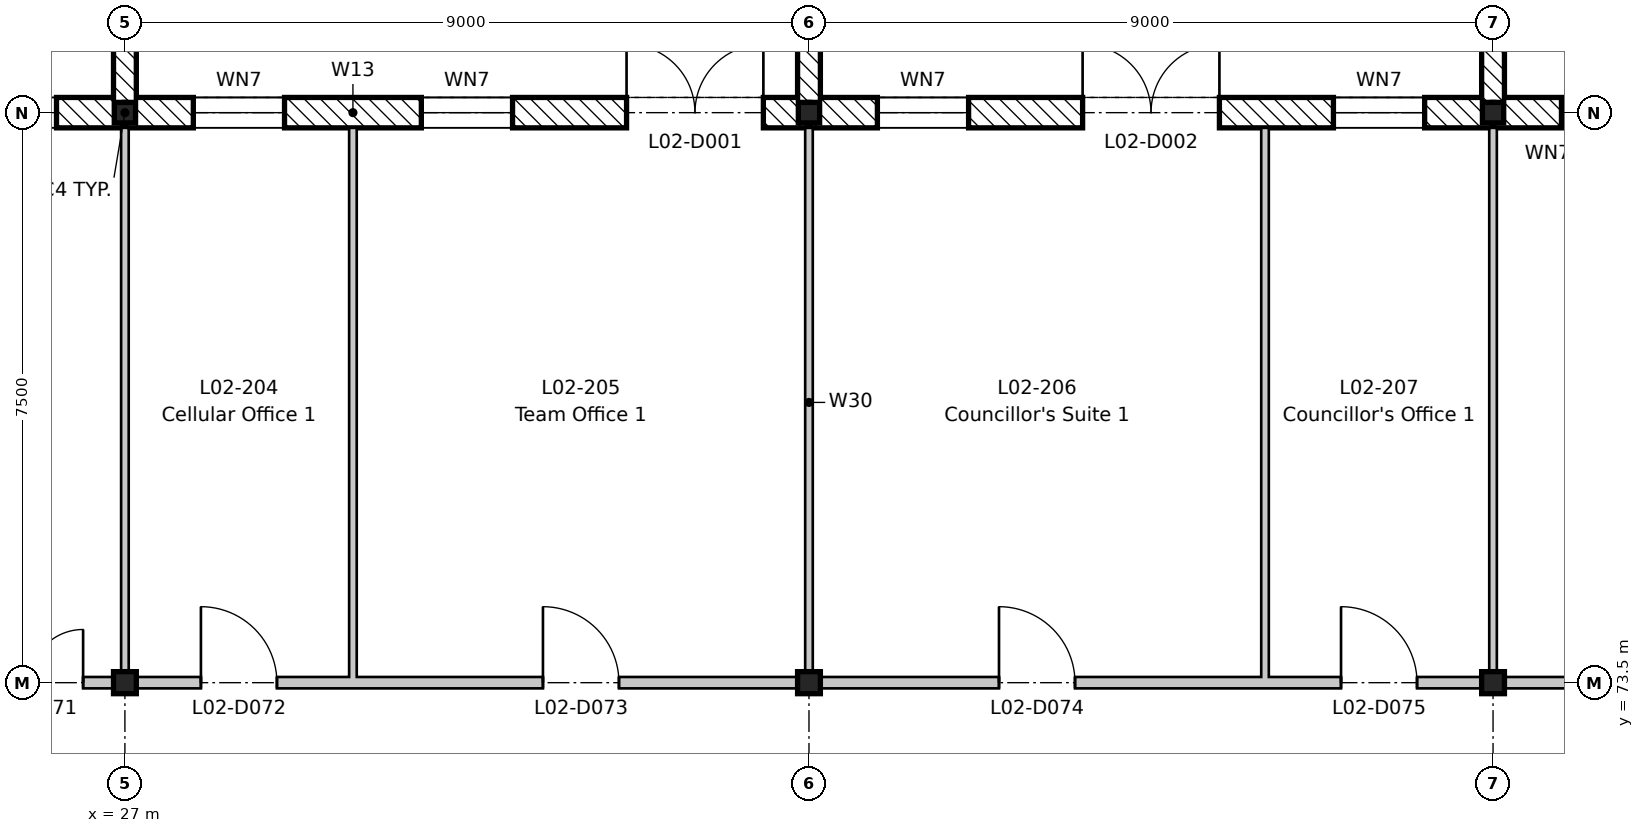
"""IFC4 building model, lengths in metres.
Left out: names, types, materials, properties, quantities, classifications, styles, units other than length and angle.
Written with IfcOpenShell. Run it as: python <this file> out.ifc"""

import sys

from ifc_helpers import new_model, si_unit, direction, frame, frame_2d, origin, origin_2d, place, context, subcontext, project, spatial, rectangle, i_section, extrude, element, fill, save


model = new_model("IFC4")
c1 = context("Model", 3, precision=1e-05, world=origin(), true_north=direction((0.0, 1.0)))
c2 = subcontext(c1, "Body", "Model", "MODEL_VIEW")
j1 = project(units=[si_unit("LENGTHUNIT", "METRE"), si_unit("PLANEANGLEUNIT", "RADIAN")], contexts=[c1])
p1 = place(None, origin())
s1 = spatial("IfcSite", under=j1, at=p1, CompositionType="ELEMENT")
p2 = place(p1, origin())
s2 = spatial("IfcBuilding", under=s1, at=p2, CompositionType="ELEMENT")
p3 = place(p2, frame((0.0, 0.0, 9.9)))
s3 = spatial("IfcBuildingStorey", under=s2, at=p3, CompositionType="ELEMENT", Elevation=9.9)
p4 = place(p3, frame((27.0, 73.5, -0.2), z_axis=(0.0, 0.0, 1.0), x_axis=(1.0, 0.0, 0.0)))
e1 = element("IfcColumn", 1, at=p4, inside=s3, PredefinedType="COLUMN", context=c2, shape_type="SweptSolid", body=[
    extrude(i_section(OverallWidth=0.3, OverallDepth=0.29, WebThickness=0.009, FlangeThickness=0.014, FilletRadius=0.027, at=origin_2d()), origin(), (0.0, 0.0, 1.0), 4.5),
])
p5 = place(p3, frame((27.0, 81.0, -0.2), z_axis=(0.0, 0.0, 1.0), x_axis=(1.0, 0.0, 0.0)))
e2 = element("IfcColumn", 2, at=p5, inside=s3, PredefinedType="COLUMN", context=c2, shape_type="SweptSolid", body=[
    extrude(i_section(OverallWidth=0.28, OverallDepth=0.27, WebThickness=0.008, FlangeThickness=0.013, FilletRadius=0.024, at=origin_2d()), origin(), (0.0, 0.0, 1.0), 4.5),
])
p6 = place(p3, frame((36.0, 73.5, -0.2), z_axis=(0.0, 0.0, 1.0), x_axis=(1.0, 0.0, 0.0)))
e3 = element("IfcColumn", 3, at=p6, inside=s3, PredefinedType="COLUMN", context=c2, shape_type="SweptSolid", body=[
    extrude(i_section(OverallWidth=0.3, OverallDepth=0.29, WebThickness=0.009, FlangeThickness=0.014, FilletRadius=0.027, at=origin_2d()), origin(), (0.0, 0.0, 1.0), 4.5),
])
p7 = place(p3, frame((36.0, 81.0, -0.2), z_axis=(0.0, 0.0, 1.0), x_axis=(1.0, 0.0, 0.0)))
e4 = element("IfcColumn", 4, at=p7, inside=s3, PredefinedType="COLUMN", context=c2, shape_type="SweptSolid", body=[
    extrude(i_section(OverallWidth=0.28, OverallDepth=0.27, WebThickness=0.008, FlangeThickness=0.013, FilletRadius=0.024, at=origin_2d()), origin(), (0.0, 0.0, 1.0), 4.5),
])
p8 = place(p3, frame((45.0, 73.5, -0.2), z_axis=(0.0, 0.0, 1.0), x_axis=(1.0, 0.0, 0.0)))
e5 = element("IfcColumn", 5, at=p8, inside=s3, PredefinedType="COLUMN", context=c2, shape_type="SweptSolid", body=[
    extrude(i_section(OverallWidth=0.3, OverallDepth=0.29, WebThickness=0.009, FlangeThickness=0.014, FilletRadius=0.027, at=origin_2d()), origin(), (0.0, 0.0, 1.0), 4.5),
])
p9 = place(p3, frame((45.0, 81.0, -0.2), z_axis=(0.0, 0.0, 1.0), x_axis=(1.0, 0.0, 0.0)))
e6 = element("IfcColumn", 6, at=p9, inside=s3, PredefinedType="COLUMN", context=c2, shape_type="SweptSolid", body=[
    extrude(i_section(OverallWidth=0.28, OverallDepth=0.27, WebThickness=0.008, FlangeThickness=0.013, FilletRadius=0.024, at=origin_2d()), origin(), (0.0, 0.0, 1.0), 4.5),
])
p10 = place(p3, frame((18.009, 81.0, 0.0), z_axis=(0.0, 0.0, 1.0), x_axis=(1.0, 0.0, 0.0)))
e7 = element("IfcWall", 7, at=p10, inside=s3, PredefinedType="STANDARD", context=c2, shape_type="SweptSolid", body=[
    extrude(rectangle(XDim=8.982, YDim=0.4, at=frame_2d((4.491, 0.0))), origin(), (0.0, 0.0, 1.0), 3.9),
])
p11 = place(p10, frame((0.891, 0.0, 0.9)))
e8 = element("IfcOpeningElement", 8, at=p11, cuts=e7, PredefinedType="OPENING", context=c2, shape_type="SweptSolid", body=[
    extrude(rectangle(XDim=1.2, YDim=2.4, at=frame_2d((0.6, 1.2))), frame((0.0, 0.21, 0.0), z_axis=(0.0, -1.0, 0.0), x_axis=(1.0, 0.0, 0.0)), (0.0, 0.0, 1.0), 0.42),
])
p12 = place(p10, frame((3.891, 0.0, 0.9)))
e9 = element("IfcOpeningElement", 9, at=p12, cuts=e7, PredefinedType="OPENING", context=c2, shape_type="SweptSolid", body=[
    extrude(rectangle(XDim=1.2, YDim=2.4, at=frame_2d((0.6, 1.2))), frame((0.0, 0.21, 0.0), z_axis=(0.0, -1.0, 0.0), x_axis=(1.0, 0.0, 0.0)), (0.0, 0.0, 1.0), 0.42),
])
p13 = place(p10, frame((6.891, 0.0, 0.9)))
e10 = element("IfcOpeningElement", 10, at=p13, cuts=e7, PredefinedType="OPENING", context=c2, shape_type="SweptSolid", body=[
    extrude(rectangle(XDim=1.2, YDim=2.4, at=frame_2d((0.6, 1.2))), frame((0.0, 0.21, 0.0), z_axis=(0.0, -1.0, 0.0), x_axis=(1.0, 0.0, 0.0)), (0.0, 0.0, 1.0), 0.42),
])
p14 = place(p3, frame((27.009, 81.0, 0.0), z_axis=(0.0, 0.0, 1.0), x_axis=(1.0, 0.0, 0.0)))
e11 = element("IfcWall", 11, at=p14, inside=s3, PredefinedType="STANDARD", context=c2, shape_type="SweptSolid", body=[
    extrude(rectangle(XDim=8.982, YDim=0.4, at=frame_2d((4.491, 0.0))), origin(), (0.0, 0.0, 1.0), 3.9),
])
p15 = place(p14, frame((6.591, 0.0, 0.0)))
e12 = element("IfcOpeningElement", 12, at=p15, cuts=e11, PredefinedType="OPENING", context=c2, shape_type="SweptSolid", body=[
    extrude(rectangle(XDim=1.8, YDim=2.4, at=frame_2d((0.9, 1.2))), frame((0.0, 0.21, 0.0), z_axis=(0.0, -1.0, 0.0), x_axis=(1.0, 0.0, 0.0)), (0.0, 0.0, 1.0), 0.42),
])
p16 = place(p14, frame((0.891, 0.0, 0.9)))
e13 = element("IfcOpeningElement", 13, at=p16, cuts=e11, PredefinedType="OPENING", context=c2, shape_type="SweptSolid", body=[
    extrude(rectangle(XDim=1.2, YDim=2.4, at=frame_2d((0.6, 1.2))), frame((0.0, 0.21, 0.0), z_axis=(0.0, -1.0, 0.0), x_axis=(1.0, 0.0, 0.0)), (0.0, 0.0, 1.0), 0.42),
])
p17 = place(p14, frame((3.891, 0.0, 0.9)))
e14 = element("IfcOpeningElement", 14, at=p17, cuts=e11, PredefinedType="OPENING", context=c2, shape_type="SweptSolid", body=[
    extrude(rectangle(XDim=1.2, YDim=2.4, at=frame_2d((0.6, 1.2))), frame((0.0, 0.21, 0.0), z_axis=(0.0, -1.0, 0.0), x_axis=(1.0, 0.0, 0.0)), (0.0, 0.0, 1.0), 0.42),
])
p18 = place(p3, frame((36.009, 81.0, 0.0), z_axis=(0.0, 0.0, 1.0), x_axis=(1.0, 0.0, 0.0)))
e15 = element("IfcWall", 15, at=p18, inside=s3, PredefinedType="STANDARD", context=c2, shape_type="SweptSolid", body=[
    extrude(rectangle(XDim=8.982, YDim=0.4, at=frame_2d((4.491, 0.0))), origin(), (0.0, 0.0, 1.0), 3.9),
])
p19 = place(p18, frame((3.591, 0.0, 0.0)))
e16 = element("IfcOpeningElement", 16, at=p19, cuts=e15, PredefinedType="OPENING", context=c2, shape_type="SweptSolid", body=[
    extrude(rectangle(XDim=1.8, YDim=2.4, at=frame_2d((0.9, 1.2))), frame((0.0, 0.21, 0.0), z_axis=(0.0, -1.0, 0.0), x_axis=(1.0, 0.0, 0.0)), (0.0, 0.0, 1.0), 0.42),
])
p20 = place(p18, frame((0.891, 0.0, 0.9)))
e17 = element("IfcOpeningElement", 17, at=p20, cuts=e15, PredefinedType="OPENING", context=c2, shape_type="SweptSolid", body=[
    extrude(rectangle(XDim=1.2, YDim=2.4, at=frame_2d((0.6, 1.2))), frame((0.0, 0.21, 0.0), z_axis=(0.0, -1.0, 0.0), x_axis=(1.0, 0.0, 0.0)), (0.0, 0.0, 1.0), 0.42),
])
p21 = place(p18, frame((6.891, 0.0, 0.9)))
e18 = element("IfcOpeningElement", 18, at=p21, cuts=e15, PredefinedType="OPENING", context=c2, shape_type="SweptSolid", body=[
    extrude(rectangle(XDim=1.2, YDim=2.4, at=frame_2d((0.6, 1.2))), frame((0.0, 0.21, 0.0), z_axis=(0.0, -1.0, 0.0), x_axis=(1.0, 0.0, 0.0)), (0.0, 0.0, 1.0), 0.42),
])
p22 = place(p3, frame((45.009, 81.0, 0.0), z_axis=(0.0, 0.0, 1.0), x_axis=(1.0, 0.0, 0.0)))
e19 = element("IfcWall", 19, at=p22, inside=s3, PredefinedType="STANDARD", context=c2, shape_type="SweptSolid", body=[
    extrude(rectangle(XDim=8.982, YDim=0.4, at=frame_2d((4.491, 0.0))), origin(), (0.0, 0.0, 1.0), 3.9),
])
p23 = place(p22, frame((0.891, 0.0, 0.9)))
e20 = element("IfcOpeningElement", 20, at=p23, cuts=e19, PredefinedType="OPENING", context=c2, shape_type="SweptSolid", body=[
    extrude(rectangle(XDim=1.2, YDim=2.4, at=frame_2d((0.6, 1.2))), frame((0.0, 0.21, 0.0), z_axis=(0.0, -1.0, 0.0), x_axis=(1.0, 0.0, 0.0)), (0.0, 0.0, 1.0), 0.42),
])
p24 = place(p22, frame((3.891, 0.0, 0.9)))
e21 = element("IfcOpeningElement", 21, at=p24, cuts=e19, PredefinedType="OPENING", context=c2, shape_type="SweptSolid", body=[
    extrude(rectangle(XDim=1.2, YDim=2.4, at=frame_2d((0.6, 1.2))), frame((0.0, 0.21, 0.0), z_axis=(0.0, -1.0, 0.0), x_axis=(1.0, 0.0, 0.0)), (0.0, 0.0, 1.0), 0.42),
])
p25 = place(p22, frame((6.891, 0.0, 0.9)))
e22 = element("IfcOpeningElement", 22, at=p25, cuts=e19, PredefinedType="OPENING", context=c2, shape_type="SweptSolid", body=[
    extrude(rectangle(XDim=1.2, YDim=2.4, at=frame_2d((0.6, 1.2))), frame((0.0, 0.21, 0.0), z_axis=(0.0, -1.0, 0.0), x_axis=(1.0, 0.0, 0.0)), (0.0, 0.0, 1.0), 0.42),
])
for number, where, z_axis, x_axis in (
    (23, (27.0, 81.135, 0.0), (0.0, 0.0, 1.0), (0.0, 1.0, 0.0)),
    (24, (36.0, 81.135, 0.0), (0.0, 0.0, 1.0), (0.0, 1.0, 0.0)),
    (25, (45.0, 81.135, 0.0), (0.0, 0.0, 1.0), (0.0, 1.0, 0.0)),
):
    element("IfcWall", number, at=place(p3, frame(where, z_axis=z_axis, x_axis=x_axis)), inside=s3, PredefinedType="STANDARD", context=c2, shape_type="SweptSolid", body=[
        extrude(rectangle(XDim=2.865, YDim=0.3, at=frame_2d((1.433, 0.0))), origin(), (0.0, 0.0, 1.0), 3.97),
    ])
p26 = place(p3, frame((27.0, 73.575, 0.0), z_axis=(0.0, 0.0, 1.0), x_axis=(0.0, 1.0, 0.0)))
e26 = element("IfcWall", 26, at=p26, inside=s3, PredefinedType="PARTITIONING", context=c2, shape_type="SweptSolid", body=[
    extrude(rectangle(XDim=7.225, YDim=0.1, at=frame_2d((3.613, 0.0))), origin(), (0.0, 0.0, 1.0), 3.95),
])
p27 = place(p3, frame((30.0, 73.575, 0.0), z_axis=(0.0, 0.0, 1.0), x_axis=(0.0, 1.0, 0.0)))
e27 = element("IfcWall", 27, at=p27, inside=s3, PredefinedType="PARTITIONING", context=c2, shape_type="SweptSolid", body=[
    extrude(rectangle(XDim=7.225, YDim=0.1, at=frame_2d((3.613, 0.0))), origin(), (0.0, 0.0, 1.0), 4.3),
])
p28 = place(p3, frame((36.0, 73.575, 0.0), z_axis=(0.0, 0.0, 1.0), x_axis=(0.0, 1.0, 0.0)))
e28 = element("IfcWall", 28, at=p28, inside=s3, PredefinedType="PARTITIONING", context=c2, shape_type="SweptSolid", body=[
    extrude(rectangle(XDim=7.225, YDim=0.1, at=frame_2d((3.613, 0.0))), origin(), (0.0, 0.0, 1.0), 3.95),
])
p29 = place(p3, frame((42.0, 73.575, 0.0), z_axis=(0.0, 0.0, 1.0), x_axis=(0.0, 1.0, 0.0)))
e29 = element("IfcWall", 29, at=p29, inside=s3, PredefinedType="PARTITIONING", context=c2, shape_type="SweptSolid", body=[
    extrude(rectangle(XDim=7.225, YDim=0.1, at=frame_2d((3.613, 0.0))), origin(), (0.0, 0.0, 1.0), 4.3),
])
p30 = place(p3, frame((45.0, 73.575, 0.0), z_axis=(0.0, 0.0, 1.0), x_axis=(0.0, 1.0, 0.0)))
e30 = element("IfcWall", 30, at=p30, inside=s3, PredefinedType="PARTITIONING", context=c2, shape_type="SweptSolid", body=[
    extrude(rectangle(XDim=7.225, YDim=0.1, at=frame_2d((3.613, 0.0))), origin(), (0.0, 0.0, 1.0), 3.95),
])
p31 = place(p3, frame((18.0, 73.5, 0.0), z_axis=(0.0, 0.0, 1.0), x_axis=(1.0, 0.0, 0.0)))
e31 = element("IfcWall", 31, at=p31, inside=s3, PredefinedType="PARTITIONING", context=c2, shape_type="SweptSolid", body=[
    extrude(rectangle(XDim=35.8, YDim=0.15, at=frame_2d((17.9, 0.0))), origin(), (0.0, 0.0, 1.0), 3.78),
])
p32 = place(p31, frame((7.05, 0.0, 0.0)))
e32 = element("IfcOpeningElement", 32, at=p32, cuts=e31, PredefinedType="OPENING", context=c2, shape_type="SweptSolid", body=[
    extrude(rectangle(XDim=1.4, YDim=2.1, at=frame_2d((0.7, 1.05))), frame((0.0, 0.085, 0.0), z_axis=(0.0, -1.0, 0.0), x_axis=(1.0, 0.0, 0.0)), (0.0, 0.0, 1.0), 0.17),
])
p33 = place(p31, frame((10.0, 0.0, 0.0)))
e33 = element("IfcOpeningElement", 33, at=p33, cuts=e31, PredefinedType="OPENING", context=c2, shape_type="SweptSolid", body=[
    extrude(rectangle(XDim=1.0, YDim=2.1, at=frame_2d((0.5, 1.05))), frame((0.0, 0.085, 0.0), z_axis=(0.0, -1.0, 0.0), x_axis=(1.0, 0.0, 0.0)), (0.0, 0.0, 1.0), 0.17),
])
p34 = place(p31, frame((14.5, 0.0, 0.0)))
e34 = element("IfcOpeningElement", 34, at=p34, cuts=e31, PredefinedType="OPENING", context=c2, shape_type="SweptSolid", body=[
    extrude(rectangle(XDim=1.0, YDim=2.1, at=frame_2d((0.5, 1.05))), frame((0.0, 0.085, 0.0), z_axis=(0.0, -1.0, 0.0), x_axis=(1.0, 0.0, 0.0)), (0.0, 0.0, 1.0), 0.17),
])
p35 = place(p31, frame((20.5, 0.0, 0.0)))
e35 = element("IfcOpeningElement", 35, at=p35, cuts=e31, PredefinedType="OPENING", context=c2, shape_type="SweptSolid", body=[
    extrude(rectangle(XDim=1.0, YDim=2.1, at=frame_2d((0.5, 1.05))), frame((0.0, 0.085, 0.0), z_axis=(0.0, -1.0, 0.0), x_axis=(1.0, 0.0, 0.0)), (0.0, 0.0, 1.0), 0.17),
])
p36 = place(p31, frame((25.0, 0.0, 0.0)))
e36 = element("IfcOpeningElement", 36, at=p36, cuts=e31, PredefinedType="OPENING", context=c2, shape_type="SweptSolid", body=[
    extrude(rectangle(XDim=1.0, YDim=2.1, at=frame_2d((0.5, 1.05))), frame((0.0, 0.085, 0.0), z_axis=(0.0, -1.0, 0.0), x_axis=(1.0, 0.0, 0.0)), (0.0, 0.0, 1.0), 0.17),
])
p37 = place(p31, frame((30.8, 0.0, 0.0)))
e37 = element("IfcOpeningElement", 37, at=p37, cuts=e31, PredefinedType="OPENING", context=c2, shape_type="SweptSolid", body=[
    extrude(rectangle(XDim=1.4, YDim=2.1, at=frame_2d((0.7, 1.05))), frame((0.0, 0.085, 0.0), z_axis=(0.0, -1.0, 0.0), x_axis=(1.0, 0.0, 0.0)), (0.0, 0.0, 1.0), 0.17),
])
p38 = place(p13, origin())
e38 = element("IfcWindow", 38, at=p38, inside=s3, PartitioningType="SINGLE_PANEL", PredefinedType="WINDOW", context=c2, shape_type="SweptSolid", body=[
    extrude(rectangle(XDim=1.2, YDim=2.4, at=frame_2d((0.6, 1.2))), frame((0.0, -0.12, 0.0), z_axis=(0.0, -1.0, 0.0), x_axis=(1.0, 0.0, 0.0)), (0.0, 0.0, 1.0), 0.06),
])
fill(e10, e38)
p39 = place(p15, origin())
e39 = element("IfcDoor", 39, at=p39, inside=s3, OperationType="DOUBLE_DOOR_SINGLE_SWING", PredefinedType="DOOR", context=c2, shape_type="SweptSolid", body=[
    extrude(rectangle(XDim=1.8, YDim=2.4, at=frame_2d((0.9, 1.2))), frame((0.0, 0.025, 0.0), z_axis=(0.0, -1.0, 0.0), x_axis=(1.0, 0.0, 0.0)), (0.0, 0.0, 1.0), 0.05),
])
fill(e12, e39)
p40 = place(p16, origin())
e40 = element("IfcWindow", 40, at=p40, inside=s3, PartitioningType="SINGLE_PANEL", PredefinedType="WINDOW", context=c2, shape_type="SweptSolid", body=[
    extrude(rectangle(XDim=1.2, YDim=2.4, at=frame_2d((0.6, 1.2))), frame((0.0, -0.12, 0.0), z_axis=(0.0, -1.0, 0.0), x_axis=(1.0, 0.0, 0.0)), (0.0, 0.0, 1.0), 0.06),
])
fill(e13, e40)
p41 = place(p17, origin())
e41 = element("IfcWindow", 41, at=p41, inside=s3, PartitioningType="SINGLE_PANEL", PredefinedType="WINDOW", context=c2, shape_type="SweptSolid", body=[
    extrude(rectangle(XDim=1.2, YDim=2.4, at=frame_2d((0.6, 1.2))), frame((0.0, -0.12, 0.0), z_axis=(0.0, -1.0, 0.0), x_axis=(1.0, 0.0, 0.0)), (0.0, 0.0, 1.0), 0.06),
])
fill(e14, e41)
p42 = place(p19, origin())
e42 = element("IfcDoor", 42, at=p42, inside=s3, OperationType="DOUBLE_DOOR_SINGLE_SWING", PredefinedType="DOOR", context=c2, shape_type="SweptSolid", body=[
    extrude(rectangle(XDim=1.8, YDim=2.4, at=frame_2d((0.9, 1.2))), frame((0.0, 0.025, 0.0), z_axis=(0.0, -1.0, 0.0), x_axis=(1.0, 0.0, 0.0)), (0.0, 0.0, 1.0), 0.05),
])
fill(e16, e42)
p43 = place(p20, origin())
e43 = element("IfcWindow", 43, at=p43, inside=s3, PartitioningType="SINGLE_PANEL", PredefinedType="WINDOW", context=c2, shape_type="SweptSolid", body=[
    extrude(rectangle(XDim=1.2, YDim=2.4, at=frame_2d((0.6, 1.2))), frame((0.0, -0.12, 0.0), z_axis=(0.0, -1.0, 0.0), x_axis=(1.0, 0.0, 0.0)), (0.0, 0.0, 1.0), 0.06),
])
fill(e17, e43)
p44 = place(p21, origin())
e44 = element("IfcWindow", 44, at=p44, inside=s3, PartitioningType="SINGLE_PANEL", PredefinedType="WINDOW", context=c2, shape_type="SweptSolid", body=[
    extrude(rectangle(XDim=1.2, YDim=2.4, at=frame_2d((0.6, 1.2))), frame((0.0, -0.12, 0.0), z_axis=(0.0, -1.0, 0.0), x_axis=(1.0, 0.0, 0.0)), (0.0, 0.0, 1.0), 0.06),
])
fill(e18, e44)
p45 = place(p23, origin())
e45 = element("IfcWindow", 45, at=p45, inside=s3, PartitioningType="SINGLE_PANEL", PredefinedType="WINDOW", context=c2, shape_type="SweptSolid", body=[
    extrude(rectangle(XDim=1.2, YDim=2.4, at=frame_2d((0.6, 1.2))), frame((0.0, -0.12, 0.0), z_axis=(0.0, -1.0, 0.0), x_axis=(1.0, 0.0, 0.0)), (0.0, 0.0, 1.0), 0.06),
])
fill(e20, e45)
p46 = place(p32, origin())
e46 = element("IfcDoor", 46, at=p46, inside=s3, OperationType="DOUBLE_DOOR_SINGLE_SWING", PredefinedType="DOOR", context=c2, shape_type="SweptSolid", body=[
    extrude(rectangle(XDim=1.4, YDim=2.1, at=frame_2d((0.7, 1.05))), frame((0.0, 0.025, 0.0), z_axis=(0.0, -1.0, 0.0), x_axis=(1.0, 0.0, 0.0)), (0.0, 0.0, 1.0), 0.05),
])
fill(e32, e46)
p47 = place(p33, origin())
e47 = element("IfcDoor", 47, at=p47, inside=s3, OperationType="SINGLE_SWING_LEFT", PredefinedType="DOOR", context=c2, shape_type="SweptSolid", body=[
    extrude(rectangle(XDim=1.0, YDim=2.1, at=frame_2d((0.5, 1.05))), frame((0.0, 0.025, 0.0), z_axis=(0.0, -1.0, 0.0), x_axis=(1.0, 0.0, 0.0)), (0.0, 0.0, 1.0), 0.05),
])
fill(e33, e47)
p48 = place(p34, origin())
e48 = element("IfcDoor", 48, at=p48, inside=s3, OperationType="SINGLE_SWING_LEFT", PredefinedType="DOOR", context=c2, shape_type="SweptSolid", body=[
    extrude(rectangle(XDim=1.0, YDim=2.1, at=frame_2d((0.5, 1.05))), frame((0.0, 0.025, 0.0), z_axis=(0.0, -1.0, 0.0), x_axis=(1.0, 0.0, 0.0)), (0.0, 0.0, 1.0), 0.05),
])
fill(e34, e48)
p49 = place(p35, origin())
e49 = element("IfcDoor", 49, at=p49, inside=s3, OperationType="SINGLE_SWING_LEFT", PredefinedType="DOOR", context=c2, shape_type="SweptSolid", body=[
    extrude(rectangle(XDim=1.0, YDim=2.1, at=frame_2d((0.5, 1.05))), frame((0.0, 0.025, 0.0), z_axis=(0.0, -1.0, 0.0), x_axis=(1.0, 0.0, 0.0)), (0.0, 0.0, 1.0), 0.05),
])
fill(e35, e49)
p50 = place(p36, origin())
e50 = element("IfcDoor", 50, at=p50, inside=s3, OperationType="SINGLE_SWING_LEFT", PredefinedType="DOOR", context=c2, shape_type="SweptSolid", body=[
    extrude(rectangle(XDim=1.0, YDim=2.1, at=frame_2d((0.5, 1.05))), frame((0.0, 0.025, 0.0), z_axis=(0.0, -1.0, 0.0), x_axis=(1.0, 0.0, 0.0)), (0.0, 0.0, 1.0), 0.05),
])
fill(e36, e50)
save(model, sys.argv[1])
